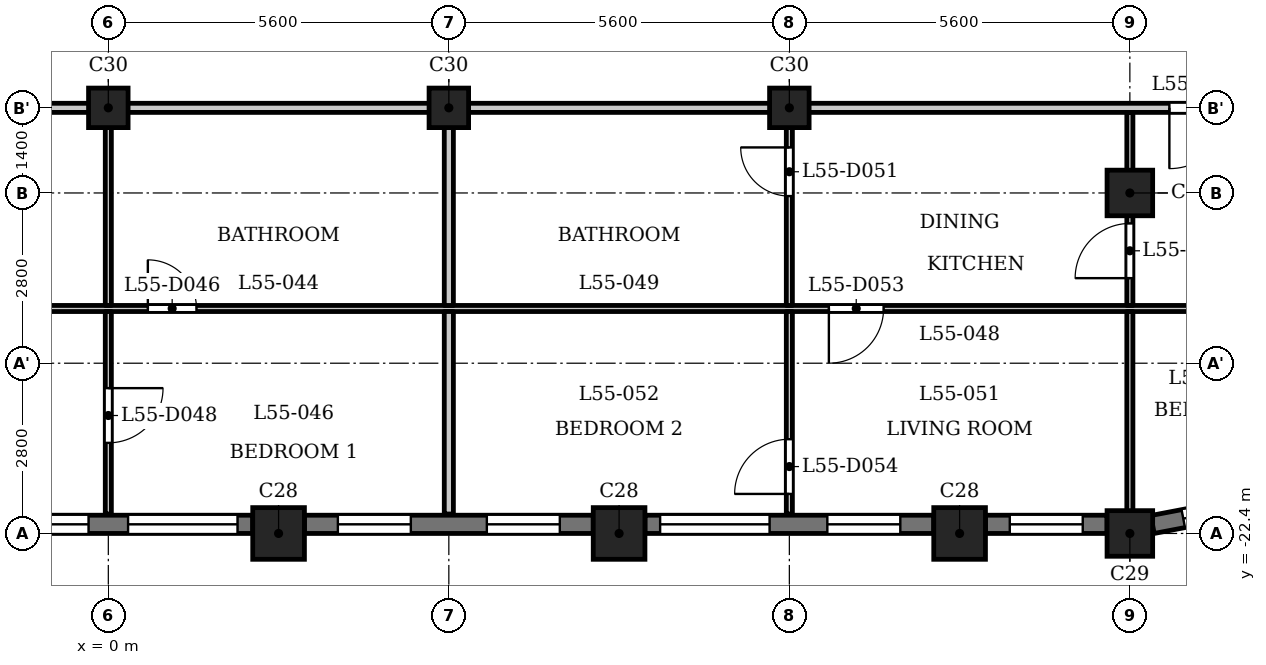
"""IFC4 building model, lengths in metres.
Left out: names, types, materials, properties, quantities, classifications, styles, units other than length and angle.
Written with IfcOpenShell. Run it as: python <this file> out.ifc"""

import sys

from ifc_helpers import new_model, si_unit, direction, frame, frame_2d, origin, origin_2d, place, context, subcontext, project, spatial, rectangle, extrude, element, fill, save


model = new_model("IFC4")
c1 = context("Model", 3, precision=1e-05, world=origin(), true_north=direction((0.0, 1.0)))
c2 = subcontext(c1, "Body", "Model", "MODEL_VIEW")
j1 = project(units=[si_unit("LENGTHUNIT", "METRE"), si_unit("PLANEANGLEUNIT", "RADIAN")], contexts=[c1])
p1 = place(None, origin())
s1 = spatial("IfcSite", under=j1, at=p1, CompositionType="ELEMENT")
p2 = place(p1, origin())
s2 = spatial("IfcBuilding", under=s1, at=p2, CompositionType="ELEMENT")
p3 = place(p2, frame((0.0, 0.0, 213.4)))
s3 = spatial("IfcBuildingStorey", under=s2, at=p3, CompositionType="ELEMENT", Elevation=213.4)
for number, where, z_axis, x_axis in (
    (1, (2.8, -22.4, 0.0), (0.0, 0.0, 1.0), (1.0, 0.0, 0.0)),
    (2, (8.4, -22.4, 0.0), (0.0, 0.0, 1.0), (1.0, 0.0, 0.0)),
    (3, (14.0, -22.4, 0.0), (0.0, 0.0, 1.0), (1.0, 0.0, 0.0)),
):
    element("IfcColumn", number, at=place(p3, frame(where, z_axis=z_axis, x_axis=x_axis)), inside=s3, PredefinedType="COLUMN", context=c2, shape_type="SweptSolid", body=[
        extrude(rectangle(XDim=0.85, YDim=0.85, at=origin_2d()), origin(), (0.0, 0.0, 1.0), 3.5),
    ])
for number, where, z_axis, x_axis in (
    (4, (16.8, -22.4, 0.0), (0.0, 0.0, 1.0), (1.0, 0.0, 0.0)),
    (5, (16.8, -16.8, 0.0), (0.0, 0.0, 1.0), (1.0, 0.0, 0.0)),
):
    element("IfcColumn", number, at=place(p3, frame(where, z_axis=z_axis, x_axis=x_axis)), inside=s3, PredefinedType="COLUMN", context=c2, shape_type="SweptSolid", body=[
        extrude(rectangle(XDim=0.75, YDim=0.75, at=origin_2d()), origin(), (0.0, 0.0, 1.0), 3.5),
    ])
for number, where, z_axis, x_axis in (
    (6, (0.0, -15.4, 0.0), (0.0, 0.0, 1.0), (1.0, 0.0, 0.0)),
    (7, (5.6, -15.4, 0.0), (0.0, 0.0, 1.0), (1.0, 0.0, 0.0)),
    (8, (11.2, -15.4, 0.0), (0.0, 0.0, 1.0), (1.0, 0.0, 0.0)),
):
    element("IfcColumn", number, at=place(p3, frame(where, z_axis=z_axis, x_axis=x_axis)), inside=s3, PredefinedType="COLUMN", context=c2, shape_type="SweptSolid", body=[
        extrude(rectangle(XDim=0.65, YDim=0.65, at=origin_2d()), origin(), (0.0, 0.0, 1.0), 3.5),
    ])
p4 = place(p3, frame((-2.375, -22.25, 0.0), z_axis=(0.0, 0.0, 1.0), x_axis=(1.0, 0.0, 0.0)))
e9 = element("IfcWall", 9, at=p4, inside=s3, PredefinedType="SOLIDWALL", context=c2, shape_type="SweptSolid", body=[
    extrude(rectangle(XDim=4.75, YDim=0.3, at=frame_2d((2.375, 0.0))), origin(), (0.0, 0.0, 1.0), 2.5),
])
p5 = place(p4, frame((0.25, 0.0, 0.9)))
e10 = element("IfcOpeningElement", 10, at=p5, cuts=e9, PredefinedType="OPENING", context=c2, shape_type="SweptSolid", body=[
    extrude(rectangle(XDim=1.8, YDim=1.25, at=frame_2d((0.9, 0.625))), frame((0.0, 0.16, 0.0), z_axis=(0.0, -1.0, 0.0), x_axis=(1.0, 0.0, 0.0)), (0.0, 0.0, 1.0), 0.32),
])
p6 = place(p4, frame((2.7, 0.0, 0.9)))
e11 = element("IfcOpeningElement", 11, at=p6, cuts=e9, PredefinedType="OPENING", context=c2, shape_type="SweptSolid", body=[
    extrude(rectangle(XDim=1.8, YDim=1.25, at=frame_2d((0.9, 0.625))), frame((0.0, 0.16, 0.0), z_axis=(0.0, -1.0, 0.0), x_axis=(1.0, 0.0, 0.0)), (0.0, 0.0, 1.0), 0.32),
])
p7 = place(p3, frame((3.225, -22.25, 0.0), z_axis=(0.0, 0.0, 1.0), x_axis=(1.0, 0.0, 0.0)))
e12 = element("IfcWall", 12, at=p7, inside=s3, PredefinedType="SOLIDWALL", context=c2, shape_type="SweptSolid", body=[
    extrude(rectangle(XDim=4.75, YDim=0.3, at=frame_2d((2.375, 0.0))), origin(), (0.0, 0.0, 1.0), 2.5),
])
p8 = place(p7, frame((0.55, 0.0, 0.6)))
e13 = element("IfcOpeningElement", 13, at=p8, cuts=e12, PredefinedType="OPENING", context=c2, shape_type="SweptSolid", body=[
    extrude(rectangle(XDim=1.2, YDim=1.55, at=frame_2d((0.6, 0.775))), frame((0.0, 0.16, 0.0), z_axis=(0.0, -1.0, 0.0), x_axis=(1.0, 0.0, 0.0)), (0.0, 0.0, 1.0), 0.32),
])
p9 = place(p7, frame((3.0, 0.0, 0.6)))
e14 = element("IfcOpeningElement", 14, at=p9, cuts=e12, PredefinedType="OPENING", context=c2, shape_type="SweptSolid", body=[
    extrude(rectangle(XDim=1.2, YDim=1.55, at=frame_2d((0.6, 0.775))), frame((0.0, 0.16, 0.0), z_axis=(0.0, -1.0, 0.0), x_axis=(1.0, 0.0, 0.0)), (0.0, 0.0, 1.0), 0.32),
])
p10 = place(p3, frame((8.825, -22.25, 0.0), z_axis=(0.0, 0.0, 1.0), x_axis=(1.0, 0.0, 0.0)))
e15 = element("IfcWall", 15, at=p10, inside=s3, PredefinedType="SOLIDWALL", context=c2, shape_type="SweptSolid", body=[
    extrude(rectangle(XDim=4.75, YDim=0.3, at=frame_2d((2.375, 0.0))), origin(), (0.0, 0.0, 1.0), 2.5),
])
p11 = place(p10, frame((0.25, 0.0, 0.9)))
e16 = element("IfcOpeningElement", 16, at=p11, cuts=e15, PredefinedType="OPENING", context=c2, shape_type="SweptSolid", body=[
    extrude(rectangle(XDim=1.8, YDim=1.25, at=frame_2d((0.9, 0.625))), frame((0.0, 0.16, 0.0), z_axis=(0.0, -1.0, 0.0), x_axis=(1.0, 0.0, 0.0)), (0.0, 0.0, 1.0), 0.32),
])
p12 = place(p10, frame((3.0, 0.0, 0.6)))
e17 = element("IfcOpeningElement", 17, at=p12, cuts=e15, PredefinedType="OPENING", context=c2, shape_type="SweptSolid", body=[
    extrude(rectangle(XDim=1.2, YDim=1.55, at=frame_2d((0.6, 0.775))), frame((0.0, 0.16, 0.0), z_axis=(0.0, -1.0, 0.0), x_axis=(1.0, 0.0, 0.0)), (0.0, 0.0, 1.0), 0.32),
])
p13 = place(p3, frame((14.425, -22.25, 0.0), z_axis=(0.0, 0.0, 1.0), x_axis=(1.0, 0.0, 0.0)))
e18 = element("IfcWall", 18, at=p13, inside=s3, PredefinedType="SOLIDWALL", context=c2, shape_type="SweptSolid", body=[
    extrude(rectangle(XDim=2.0, YDim=0.3, at=frame_2d((1.0, 0.0))), origin(), (0.0, 0.0, 1.0), 2.5),
])
p14 = place(p13, frame((0.4, 0.0, 0.6)))
e19 = element("IfcOpeningElement", 19, at=p14, cuts=e18, PredefinedType="OPENING", context=c2, shape_type="SweptSolid", body=[
    extrude(rectangle(XDim=1.2, YDim=1.55, at=frame_2d((0.6, 0.775))), frame((0.0, 0.16, 0.0), z_axis=(0.0, -1.0, 0.0), x_axis=(1.0, 0.0, 0.0)), (0.0, 0.0, 1.0), 0.32),
])
p15 = place(p3, frame((17.172, -22.253, 0.0), z_axis=(0.0, 0.0, 1.0), x_axis=(0.982300037503, 0.187314271538, 0.0)))
e20 = element("IfcWall", 20, at=p15, inside=s3, PredefinedType="SOLIDWALL", context=c2, shape_type="SweptSolid", body=[
    extrude(rectangle(XDim=1.831, YDim=0.3, at=frame_2d((0.916, 0.0))), origin(), (0.0, 0.0, 1.0), 2.5),
])
p16 = place(p15, frame((0.516, 0.0, 0.6)))
e21 = element("IfcOpeningElement", 21, at=p16, cuts=e20, PredefinedType="OPENING", context=c2, shape_type="SweptSolid", body=[
    extrude(rectangle(XDim=0.8, YDim=1.55, at=frame_2d((0.4, 0.775))), frame((0.0, 0.16, 0.0), z_axis=(0.0, -1.0, 0.0), x_axis=(1.0, 0.0, 0.0)), (0.0, 0.0, 1.0), 0.32),
])
p17 = place(p3, frame((-22.856, -18.7, 0.0), z_axis=(0.0, 0.0, 1.0), x_axis=(1.0, 0.0, 0.0)))
e22 = element("IfcWall", 22, at=p17, inside=s3, PredefinedType="PARTITIONING", context=c2, shape_type="SweptSolid", body=[
    extrude(rectangle(XDim=45.711, YDim=0.1, at=frame_2d((22.856, 0.0))), origin(), (0.0, 0.0, 1.0), 3.2),
])
p18 = place(p17, frame((4.084, 0.0, 0.0)))
e23 = element("IfcOpeningElement", 23, at=p18, cuts=e22, PredefinedType="OPENING", context=c2, shape_type="SweptSolid", body=[
    extrude(rectangle(XDim=0.9, YDim=2.1, at=frame_2d((0.45, 1.05))), frame((0.0, 0.06, 0.0), z_axis=(0.0, -1.0, 0.0), x_axis=(1.0, 0.0, 0.0)), (0.0, 0.0, 1.0), 0.12),
])
p19 = place(p17, frame((7.456, 0.0, 0.0)))
e24 = element("IfcOpeningElement", 24, at=p19, cuts=e22, PredefinedType="OPENING", context=c2, shape_type="SweptSolid", body=[
    extrude(rectangle(XDim=0.9, YDim=2.1, at=frame_2d((0.45, 1.05))), frame((0.0, 0.06, 0.0), z_axis=(0.0, -1.0, 0.0), x_axis=(1.0, 0.0, 0.0)), (0.0, 0.0, 1.0), 0.12),
])
p20 = place(p17, frame((23.506, 0.0, 0.0)))
e25 = element("IfcOpeningElement", 25, at=p20, cuts=e22, PredefinedType="OPENING", context=c2, shape_type="SweptSolid", body=[
    extrude(rectangle(XDim=0.8, YDim=2.1, at=frame_2d((0.4, 1.05))), frame((0.0, 0.06, 0.0), z_axis=(0.0, -1.0, 0.0), x_axis=(1.0, 0.0, 0.0)), (0.0, 0.0, 1.0), 0.12),
])
p21 = place(p17, frame((17.906, 0.0, 0.0)))
e26 = element("IfcOpeningElement", 26, at=p21, cuts=e22, PredefinedType="OPENING", context=c2, shape_type="SweptSolid", body=[
    extrude(rectangle(XDim=0.9, YDim=2.1, at=frame_2d((0.45, 1.05))), frame((0.0, 0.06, 0.0), z_axis=(0.0, -1.0, 0.0), x_axis=(1.0, 0.0, 0.0)), (0.0, 0.0, 1.0), 0.12),
])
p22 = place(p17, frame((43.806, 0.0, 0.0)))
e27 = element("IfcOpeningElement", 27, at=p22, cuts=e22, PredefinedType="OPENING", context=c2, shape_type="SweptSolid", body=[
    extrude(rectangle(XDim=0.9, YDim=2.1, at=frame_2d((0.45, 1.05))), frame((0.0, 0.06, 0.0), z_axis=(0.0, -1.0, 0.0), x_axis=(1.0, 0.0, 0.0)), (0.0, 0.0, 1.0), 0.12),
])
p23 = place(p17, frame((34.706, 0.0, 0.0)))
e28 = element("IfcOpeningElement", 28, at=p23, cuts=e22, PredefinedType="OPENING", context=c2, shape_type="SweptSolid", body=[
    extrude(rectangle(XDim=0.9, YDim=2.1, at=frame_2d((0.45, 1.05))), frame((0.0, 0.06, 0.0), z_axis=(0.0, -1.0, 0.0), x_axis=(1.0, 0.0, 0.0)), (0.0, 0.0, 1.0), 0.12),
])
p24 = place(p3, frame((-24.684, -15.4, 0.0), z_axis=(0.0, 0.0, 1.0), x_axis=(1.0, 0.0, 0.0)))
e29 = element("IfcWall", 29, at=p24, inside=s3, PredefinedType="PARTITIONING", context=c2, shape_type="SweptSolid", body=[
    extrude(rectangle(XDim=49.368, YDim=0.15, at=frame_2d((24.684, 0.0))), origin(), (0.0, 0.0, 1.0), 3.2),
])
p25 = place(p24, frame((1.143, 0.0, 0.0)))
e30 = element("IfcOpeningElement", 30, at=p25, cuts=e29, PredefinedType="OPENING", context=c2, shape_type="SweptSolid", body=[
    extrude(rectangle(XDim=1.0, YDim=2.1, at=frame_2d((0.5, 1.05))), frame((0.0, 0.085, 0.0), z_axis=(0.0, -1.0, 0.0), x_axis=(1.0, 0.0, 0.0)), (0.0, 0.0, 1.0), 0.17),
])
p26 = place(p24, frame((19.734, 0.0, 0.0)))
e31 = element("IfcOpeningElement", 31, at=p26, cuts=e29, PredefinedType="OPENING", context=c2, shape_type="SweptSolid", body=[
    extrude(rectangle(XDim=1.0, YDim=2.1, at=frame_2d((0.5, 1.05))), frame((0.0, 0.085, 0.0), z_axis=(0.0, -1.0, 0.0), x_axis=(1.0, 0.0, 0.0)), (0.0, 0.0, 1.0), 0.17),
])
p27 = place(p24, frame((42.134, 0.0, 0.0)))
e32 = element("IfcOpeningElement", 32, at=p27, cuts=e29, PredefinedType="OPENING", context=c2, shape_type="SweptSolid", body=[
    extrude(rectangle(XDim=1.0, YDim=2.1, at=frame_2d((0.5, 1.05))), frame((0.0, 0.085, 0.0), z_axis=(0.0, -1.0, 0.0), x_axis=(1.0, 0.0, 0.0)), (0.0, 0.0, 1.0), 0.17),
])
p28 = place(p3, frame((0.0, -22.08, 0.0), z_axis=(0.0, 0.0, 1.0), x_axis=(0.0, 1.0, 0.0)))
e33 = element("IfcWall", 33, at=p28, inside=s3, PredefinedType="PARTITIONING", context=c2, shape_type="SweptSolid", body=[
    extrude(rectangle(XDim=3.33, YDim=0.1, at=frame_2d((1.665, 0.0))), origin(), (0.0, 0.0, 1.0), 3.2),
])
p29 = place(p28, frame((1.17, 0.0, 0.0)))
e34 = element("IfcOpeningElement", 34, at=p29, cuts=e33, PredefinedType="OPENING", context=c2, shape_type="SweptSolid", body=[
    extrude(rectangle(XDim=0.9, YDim=2.1, at=frame_2d((0.45, 1.05))), frame((0.0, 0.06, 0.0), z_axis=(0.0, -1.0, 0.0), x_axis=(1.0, 0.0, 0.0)), (0.0, 0.0, 1.0), 0.12),
])
p30 = place(p3, frame((0.0, -18.65, 0.0), z_axis=(0.0, 0.0, 1.0), x_axis=(0.0, 1.0, 0.0)))
e35 = element("IfcWall", 35, at=p30, inside=s3, PredefinedType="PARTITIONING", context=c2, shape_type="SweptSolid", body=[
    extrude(rectangle(XDim=3.175, YDim=0.1, at=frame_2d((1.587, 0.0))), origin(), (0.0, 0.0, 1.0), 3.2),
])
p31 = place(p3, frame((5.6, -22.08, 0.0), z_axis=(0.0, 0.0, 1.0), x_axis=(0.0, 1.0, 0.0)))
e36 = element("IfcWall", 36, at=p31, inside=s3, PredefinedType="PARTITIONING", context=c2, shape_type="SweptSolid", body=[
    extrude(rectangle(XDim=3.33, YDim=0.15, at=frame_2d((1.665, 0.0))), origin(), (0.0, 0.0, 1.0), 3.2),
])
p32 = place(p3, frame((5.6, -18.65, 0.0), z_axis=(0.0, 0.0, 1.0), x_axis=(0.0, 1.0, 0.0)))
e37 = element("IfcWall", 37, at=p32, inside=s3, PredefinedType="PARTITIONING", context=c2, shape_type="SweptSolid", body=[
    extrude(rectangle(XDim=3.175, YDim=0.15, at=frame_2d((1.587, 0.0))), origin(), (0.0, 0.0, 1.0), 3.2),
])
p33 = place(p3, frame((11.2, -22.08, 0.0), z_axis=(0.0, 0.0, 1.0), x_axis=(0.0, 1.0, 0.0)))
e38 = element("IfcWall", 38, at=p33, inside=s3, PredefinedType="PARTITIONING", context=c2, shape_type="SweptSolid", body=[
    extrude(rectangle(XDim=3.33, YDim=0.1, at=frame_2d((1.665, 0.0))), origin(), (0.0, 0.0, 1.0), 3.2),
])
p34 = place(p33, frame((0.33, 0.0, 0.0)))
e39 = element("IfcOpeningElement", 39, at=p34, cuts=e38, PredefinedType="OPENING", context=c2, shape_type="SweptSolid", body=[
    extrude(rectangle(XDim=0.9, YDim=2.1, at=frame_2d((0.45, 1.05))), frame((0.0, 0.06, 0.0), z_axis=(0.0, -1.0, 0.0), x_axis=(1.0, 0.0, 0.0)), (0.0, 0.0, 1.0), 0.12),
])
p35 = place(p3, frame((11.2, -18.65, 0.0), z_axis=(0.0, 0.0, 1.0), x_axis=(0.0, 1.0, 0.0)))
e40 = element("IfcWall", 40, at=p35, inside=s3, PredefinedType="PARTITIONING", context=c2, shape_type="SweptSolid", body=[
    extrude(rectangle(XDim=3.175, YDim=0.1, at=frame_2d((1.587, 0.0))), origin(), (0.0, 0.0, 1.0), 3.2),
])
p36 = place(p35, frame((1.799, 0.0, 0.0)))
e41 = element("IfcOpeningElement", 41, at=p36, cuts=e40, PredefinedType="OPENING", context=c2, shape_type="SweptSolid", body=[
    extrude(rectangle(XDim=0.8, YDim=2.1, at=frame_2d((0.4, 1.05))), frame((0.0, 0.06, 0.0), z_axis=(0.0, -1.0, 0.0), x_axis=(1.0, 0.0, 0.0)), (0.0, 0.0, 1.0), 0.12),
])
p37 = place(p3, frame((16.8, -22.31, 0.0), z_axis=(0.0, 0.0, 1.0), x_axis=(0.0, 1.0, 0.0)))
e42 = element("IfcWall", 42, at=p37, inside=s3, PredefinedType="PARTITIONING", context=c2, shape_type="SweptSolid", body=[
    extrude(rectangle(XDim=3.56, YDim=0.1, at=frame_2d((1.78, 0.0))), origin(), (0.0, 0.0, 1.0), 2.55),
])
p38 = place(p3, frame((16.8, -18.65, 0.0), z_axis=(0.0, 0.0, 1.0), x_axis=(0.0, 1.0, 0.0)))
e43 = element("IfcWall", 43, at=p38, inside=s3, PredefinedType="PARTITIONING", context=c2, shape_type="SweptSolid", body=[
    extrude(rectangle(XDim=3.175, YDim=0.1, at=frame_2d((1.587, 0.0))), origin(), (0.0, 0.0, 1.0), 2.55),
])
p39 = place(p38, frame((0.449, 0.0, 0.0)))
e44 = element("IfcOpeningElement", 44, at=p39, cuts=e43, PredefinedType="OPENING", context=c2, shape_type="SweptSolid", body=[
    extrude(rectangle(XDim=0.9, YDim=2.1, at=frame_2d((0.45, 1.05))), frame((0.0, 0.06, 0.0), z_axis=(0.0, -1.0, 0.0), x_axis=(1.0, 0.0, 0.0)), (0.0, 0.0, 1.0), 0.12),
])
p40 = place(p20, origin())
e45 = element("IfcDoor", 45, at=p40, inside=s3, OperationType="SINGLE_SWING_RIGHT", PredefinedType="DOOR", context=c2, shape_type="SweptSolid", body=[
    extrude(rectangle(XDim=0.8, YDim=2.1, at=frame_2d((0.4, 1.05))), frame((0.0, 0.025, 0.0), z_axis=(0.0, -1.0, 0.0), x_axis=(1.0, 0.0, 0.0)), (0.0, 0.0, 1.0), 0.05),
])
fill(e25, e45)
p41 = place(p29, origin())
e46 = element("IfcDoor", 46, at=p41, inside=s3, OperationType="SINGLE_SWING_RIGHT", PredefinedType="DOOR", context=c2, shape_type="SweptSolid", body=[
    extrude(rectangle(XDim=0.9, YDim=2.1, at=frame_2d((0.45, 1.05))), frame((0.0, 0.025, 0.0), z_axis=(0.0, -1.0, 0.0), x_axis=(1.0, 0.0, 0.0)), (0.0, 0.0, 1.0), 0.05),
])
fill(e34, e46)
p42 = place(p27, origin())
e47 = element("IfcDoor", 47, at=p42, inside=s3, OperationType="SINGLE_SWING_LEFT", PredefinedType="DOOR", context=c2, shape_type="SweptSolid", body=[
    extrude(rectangle(XDim=1.0, YDim=2.1, at=frame_2d((0.5, 1.05))), frame((0.0, 0.025, 0.0), z_axis=(0.0, -1.0, 0.0), x_axis=(1.0, 0.0, 0.0)), (0.0, 0.0, 1.0), 0.05),
])
fill(e32, e47)
p43 = place(p39, origin())
e48 = element("IfcDoor", 48, at=p43, inside=s3, OperationType="SINGLE_SWING_RIGHT", PredefinedType="DOOR", context=c2, shape_type="SweptSolid", body=[
    extrude(rectangle(XDim=0.9, YDim=2.1, at=frame_2d((0.45, 1.05))), frame((0.0, 0.025, 0.0), z_axis=(0.0, -1.0, 0.0), x_axis=(1.0, 0.0, 0.0)), (0.0, 0.0, 1.0), 0.05),
])
fill(e44, e48)
p44 = place(p36, origin())
e49 = element("IfcDoor", 49, at=p44, inside=s3, OperationType="SINGLE_SWING_LEFT", PredefinedType="DOOR", context=c2, shape_type="SweptSolid", body=[
    extrude(rectangle(XDim=0.8, YDim=2.1, at=frame_2d((0.4, 1.05))), frame((0.0, 0.025, 0.0), z_axis=(0.0, -1.0, 0.0), x_axis=(1.0, 0.0, 0.0)), (0.0, 0.0, 1.0), 0.05),
])
fill(e41, e49)
p45 = place(p23, origin())
e50 = element("IfcDoor", 50, at=p45, inside=s3, OperationType="SINGLE_SWING_LEFT", PredefinedType="DOOR", context=c2, shape_type="SweptSolid", body=[
    extrude(rectangle(XDim=0.9, YDim=2.1, at=frame_2d((0.45, 1.05))), frame((0.0, 0.025, 0.0), z_axis=(0.0, -1.0, 0.0), x_axis=(1.0, 0.0, 0.0)), (0.0, 0.0, 1.0), 0.05),
])
fill(e28, e50)
p46 = place(p34, origin())
e51 = element("IfcDoor", 51, at=p46, inside=s3, OperationType="SINGLE_SWING_RIGHT", PredefinedType="DOOR", context=c2, shape_type="SweptSolid", body=[
    extrude(rectangle(XDim=0.9, YDim=2.1, at=frame_2d((0.45, 1.05))), frame((0.0, 0.025, 0.0), z_axis=(0.0, -1.0, 0.0), x_axis=(1.0, 0.0, 0.0)), (0.0, 0.0, 1.0), 0.05),
])
fill(e39, e51)
p47 = place(p5, origin())
e52 = element("IfcWindow", 52, at=p47, inside=s3, PartitioningType="SINGLE_PANEL", PredefinedType="WINDOW", context=c2, shape_type="SweptSolid", body=[
    extrude(rectangle(XDim=1.8, YDim=1.25, at=frame_2d((0.9, 0.625))), frame((0.0, 0.03, 0.0), z_axis=(0.0, -1.0, 0.0), x_axis=(1.0, 0.0, 0.0)), (0.0, 0.0, 1.0), 0.06),
])
fill(e10, e52)
p48 = place(p6, origin())
e53 = element("IfcWindow", 53, at=p48, inside=s3, PartitioningType="SINGLE_PANEL", PredefinedType="WINDOW", context=c2, shape_type="SweptSolid", body=[
    extrude(rectangle(XDim=1.8, YDim=1.25, at=frame_2d((0.9, 0.625))), frame((0.0, 0.03, 0.0), z_axis=(0.0, -1.0, 0.0), x_axis=(1.0, 0.0, 0.0)), (0.0, 0.0, 1.0), 0.06),
])
fill(e11, e53)
p49 = place(p8, origin())
e54 = element("IfcWindow", 54, at=p49, inside=s3, PartitioningType="SINGLE_PANEL", PredefinedType="WINDOW", context=c2, shape_type="SweptSolid", body=[
    extrude(rectangle(XDim=1.2, YDim=1.55, at=frame_2d((0.6, 0.775))), frame((0.0, 0.03, 0.0), z_axis=(0.0, -1.0, 0.0), x_axis=(1.0, 0.0, 0.0)), (0.0, 0.0, 1.0), 0.06),
])
fill(e13, e54)
p50 = place(p9, origin())
e55 = element("IfcWindow", 55, at=p50, inside=s3, PartitioningType="SINGLE_PANEL", PredefinedType="WINDOW", context=c2, shape_type="SweptSolid", body=[
    extrude(rectangle(XDim=1.2, YDim=1.55, at=frame_2d((0.6, 0.775))), frame((0.0, 0.03, 0.0), z_axis=(0.0, -1.0, 0.0), x_axis=(1.0, 0.0, 0.0)), (0.0, 0.0, 1.0), 0.06),
])
fill(e14, e55)
p51 = place(p11, origin())
e56 = element("IfcWindow", 56, at=p51, inside=s3, PartitioningType="SINGLE_PANEL", PredefinedType="WINDOW", context=c2, shape_type="SweptSolid", body=[
    extrude(rectangle(XDim=1.8, YDim=1.25, at=frame_2d((0.9, 0.625))), frame((0.0, 0.03, 0.0), z_axis=(0.0, -1.0, 0.0), x_axis=(1.0, 0.0, 0.0)), (0.0, 0.0, 1.0), 0.06),
])
fill(e16, e56)
p52 = place(p12, origin())
e57 = element("IfcWindow", 57, at=p52, inside=s3, PartitioningType="SINGLE_PANEL", PredefinedType="WINDOW", context=c2, shape_type="SweptSolid", body=[
    extrude(rectangle(XDim=1.2, YDim=1.55, at=frame_2d((0.6, 0.775))), frame((0.0, 0.03, 0.0), z_axis=(0.0, -1.0, 0.0), x_axis=(1.0, 0.0, 0.0)), (0.0, 0.0, 1.0), 0.06),
])
fill(e17, e57)
p53 = place(p14, origin())
e58 = element("IfcWindow", 58, at=p53, inside=s3, PartitioningType="SINGLE_PANEL", PredefinedType="WINDOW", context=c2, shape_type="SweptSolid", body=[
    extrude(rectangle(XDim=1.2, YDim=1.55, at=frame_2d((0.6, 0.775))), frame((0.0, 0.03, 0.0), z_axis=(0.0, -1.0, 0.0), x_axis=(1.0, 0.0, 0.0)), (0.0, 0.0, 1.0), 0.06),
])
fill(e19, e58)
p54 = place(p16, origin())
e59 = element("IfcWindow", 59, at=p54, inside=s3, PartitioningType="SINGLE_PANEL", PredefinedType="WINDOW", context=c2, shape_type="SweptSolid", body=[
    extrude(rectangle(XDim=0.8, YDim=1.55, at=frame_2d((0.4, 0.775))), frame((0.0, 0.03, 0.0), z_axis=(0.0, -1.0, 0.0), x_axis=(1.0, 0.0, 0.0)), (0.0, 0.0, 1.0), 0.06),
])
fill(e21, e59)
save(model, sys.argv[1])
